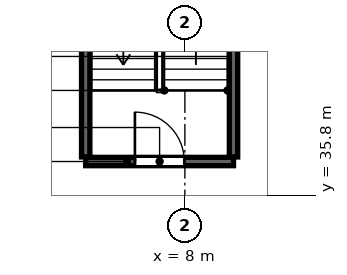
"""IFC4 building model, lengths in metres.
Left out: names, types, materials, properties, quantities, classifications, styles, units other than length and angle.
Written with IfcOpenShell. Run it as: python <this file> out.ifc"""

import sys

from ifc_helpers import new_model, si_unit, direction, frame, frame_2d, origin, place, context, subcontext, project, spatial, rectangle, extrude, source, transform, mapped, element, fill, save


model = new_model("IFC4")
c1 = context("Model", 3, precision=1e-05, world=origin(), true_north=direction((0.0, 1.0)))
c2 = subcontext(c1, "Body", "Model", "MODEL_VIEW")
j1 = project(units=[si_unit("LENGTHUNIT", "METRE"), si_unit("PLANEANGLEUNIT", "RADIAN")], contexts=[c1])
p1 = place(None, origin())
s1 = spatial("IfcSite", under=j1, at=p1, CompositionType="ELEMENT")
p2 = place(p1, origin())
s2 = spatial("IfcBuilding", under=s1, at=p2, CompositionType="ELEMENT")
p3 = place(p2, frame((0.0, 0.0, 24.0)))
s3 = spatial("IfcBuildingStorey", under=s2, at=p3, CompositionType="ELEMENT", Elevation=24.0)
m1 = source(origin(), c2, "Body", "SweptSolid", [
    extrude(rectangle(XDim=3.89, YDim=0.22, at=frame_2d((1.945, 0.0))), origin(), (0.0, 0.0, 1.0), 6.0),
])
p4 = place(p3, frame((5.39, 36.69, 0.0), z_axis=(0.0, 0.0, 1.0), x_axis=(1.0, 0.0, 0.0)))
e1 = element("IfcWall", 1, at=p4, inside=s3, PredefinedType="SOLIDWALL", context=c2, shape_type="MappedRepresentation", body=[
    mapped(m1, transform((0.0, 0.0, 0.0), scale=1.0)),
])
p5 = place(p4, frame((1.295, 0.0, 0.0)))
e2 = element("IfcOpeningElement", 2, at=p5, cuts=e1, PredefinedType="OPENING", context=c2, shape_type="SweptSolid", body=[
    extrude(rectangle(XDim=1.3, YDim=2.15, at=frame_2d((0.65, 1.075))), frame((0.0, 0.12, 0.0), z_axis=(0.0, -1.0, 0.0), x_axis=(1.0, 0.0, 0.0)), (0.0, 0.0, 1.0), 0.24),
])
m2 = source(origin(), c2, "Body", "SweptSolid", [
    extrude(rectangle(XDim=10.38, YDim=0.22, at=frame_2d((5.19, 0.0))), origin(), (0.0, 0.0, 1.0), 6.0),
])
for number, where, z_axis, x_axis in (
    (3, (5.39, 36.81, 0.0), (0.0, 0.0, 1.0), (0.0, 1.0, 0.0)),
    (4, (9.28, 36.81, 0.0), (0.0, 0.0, 1.0), (0.0, 1.0, 0.0)),
):
    element("IfcWall", number, at=place(p3, frame(where, z_axis=z_axis, x_axis=x_axis)), inside=s3, PredefinedType="SOLIDWALL", context=c2, shape_type="MappedRepresentation", body=[
        mapped(m2, transform((0.0, 0.0, 0.0), scale=1.0)),
    ])
m3 = source(origin(), c2, "Body", "SweptSolid", [
    extrude(rectangle(XDim=1.3, YDim=2.15, at=frame_2d((0.65, 1.075))), frame((0.0, 0.025, 0.0), z_axis=(0.0, -1.0, 0.0), x_axis=(1.0, 0.0, 0.0)), (0.0, 0.0, 1.0), 0.05),
])
p6 = place(p5, origin())
e5 = element("IfcDoor", 5, at=p6, inside=s3, OperationType="SINGLE_SWING_LEFT", PredefinedType="DOOR", context=c2, shape_type="MappedRepresentation", body=[
    mapped(m3, transform((0.0, 0.0, 0.0), scale=1.0)),
])
fill(e2, e5)
save(model, sys.argv[1])
